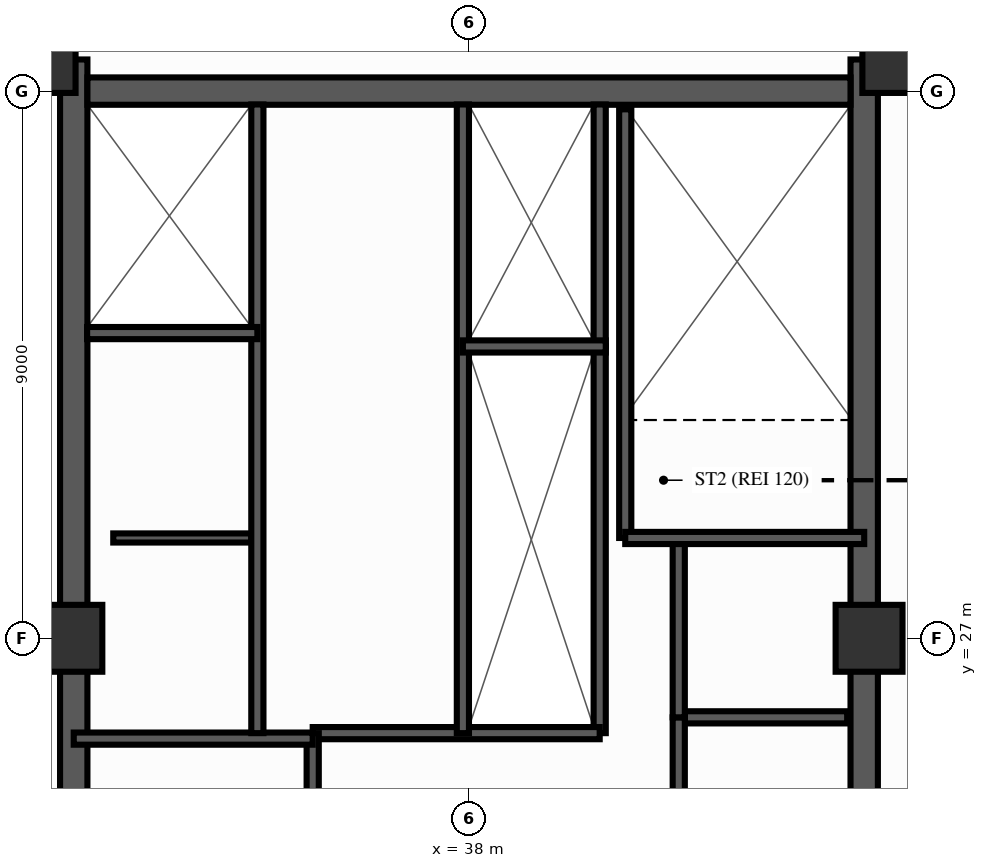
"""IFC4 building model, lengths in metres.
Left out: names, types, materials, properties, quantities, classifications, styles, units other than length and angle.
Written with IfcOpenShell. Run it as: python <this file> out.ifc"""

import sys

from ifc_helpers import new_model, si_unit, direction, frame, frame_2d, origin, origin_2d, place, context, subcontext, project, spatial, rectangle, extrude, source, transform, mapped, element, fill, save


model = new_model("IFC4")
c1 = context("Model", 3, precision=1e-05, world=origin(), true_north=direction((0.0, 1.0)))
c2 = subcontext(c1, "Body", "Model", "MODEL_VIEW")
j1 = project(units=[si_unit("LENGTHUNIT", "METRE"), si_unit("PLANEANGLEUNIT", "RADIAN")], contexts=[c1])
p1 = place(None, origin())
s1 = spatial("IfcSite", under=j1, at=p1, CompositionType="ELEMENT")
p2 = place(p1, origin())
s2 = spatial("IfcBuilding", under=s1, at=p2, CompositionType="ELEMENT")
p3 = place(p2, frame((0.0, 0.0, 148.7)))
s3 = spatial("IfcBuildingStorey", under=s2, at=p3, CompositionType="ELEMENT", Elevation=148.7)
p4 = place(p3, frame((31.5, 17.48, 0.0), z_axis=(0.0, 0.0, 1.0), x_axis=(0.0, 1.0, 0.0)))
e1 = element("IfcWall", 1, at=p4, inside=s3, PredefinedType="SHEAR", context=c2, shape_type="SweptSolid", body=[
    extrude(rectangle(XDim=19.04, YDim=0.45, at=frame_2d((9.52, 0.0))), origin(), (0.0, 0.0, 1.0), 3.5),
])
p5 = place(p4, frame((6.32, 0.0, 0.0)))
e2 = element("IfcOpeningElement", 2, at=p5, cuts=e1, PredefinedType="OPENING", context=c2, shape_type="SweptSolid", body=[
    extrude(rectangle(XDim=1.1, YDim=2.15, at=frame_2d((0.55, 1.075))), frame((0.0, 0.237, 0.0), z_axis=(0.0, -1.0, 0.0), x_axis=(1.0, 0.0, 0.0)), (0.0, 0.0, 1.0), 0.474),
])
p6 = place(p3, frame((44.5, 17.48, 0.0), z_axis=(0.0, 0.0, 1.0), x_axis=(0.0, 1.0, 0.0)))
e3 = element("IfcWall", 3, at=p6, inside=s3, PredefinedType="SHEAR", context=c2, shape_type="SweptSolid", body=[
    extrude(rectangle(XDim=19.04, YDim=0.45, at=frame_2d((9.52, 0.0))), origin(), (0.0, 0.0, 1.0), 3.5),
])
p7 = place(p6, frame((12.67, 0.0, 0.0), z_axis=(0.0, 0.0, 1.0), x_axis=(-1.0, 0.0, 0.0)))
e4 = element("IfcOpeningElement", 4, at=p7, cuts=e3, PredefinedType="OPENING", context=c2, shape_type="SweptSolid", body=[
    extrude(rectangle(XDim=1.1, YDim=2.15, at=frame_2d((0.55, 1.075))), frame((0.0, 0.237, 0.0), z_axis=(0.0, -1.0, 0.0), x_axis=(1.0, 0.0, 0.0)), (0.0, 0.0, 1.0), 0.474),
])
p8 = place(p3, frame((31.725, 36.0, 0.0), z_axis=(0.0, 0.0, 1.0), x_axis=(1.0, 0.0, 0.0)))
e5 = element("IfcWall", 5, at=p8, inside=s3, PredefinedType="SHEAR", context=c2, shape_type="SweptSolid", body=[
    extrude(rectangle(XDim=12.55, YDim=0.45, at=frame_2d((6.275, 0.0))), origin(), (0.0, 0.0, 1.0), 3.5),
])
p9 = place(p8, frame((5.225, 0.0, 0.0), z_axis=(0.0, 0.0, 1.0), x_axis=(-1.0, 0.0, 0.0)))
e6 = element("IfcOpeningElement", 6, at=p9, cuts=e5, PredefinedType="OPENING", context=c2, shape_type="SweptSolid", body=[
    extrude(rectangle(XDim=1.4, YDim=2.15, at=frame_2d((0.7, 1.075))), frame((0.0, 0.237, 0.0), z_axis=(0.0, -1.0, 0.0), x_axis=(1.0, 0.0, 0.0)), (0.0, 0.0, 1.0), 0.474),
])
m1 = source(origin(), c2, "Body", "SweptSolid", [
    extrude(rectangle(XDim=1.1, YDim=1.1, at=origin_2d()), origin(), (0.0, 0.0, 1.0), 3.5),
])
for number, where, z_axis, x_axis in (
    (7, (30.98, 36.52, 0.0), (0.0, 0.0, 1.0), (1.0, 0.0, 0.0)),
    (8, (45.02, 36.52, 0.0), (0.0, 0.0, 1.0), (1.0, 0.0, 0.0)),
    (9, (31.42, 27.0, 0.0), (0.0, 0.0, 1.0), (1.0, 0.0, 0.0)),
    (10, (44.58, 27.0, 0.0), (0.0, 0.0, 1.0), (1.0, 0.0, 0.0)),
):
    element("IfcColumn", number, at=place(p3, frame(where, z_axis=z_axis, x_axis=x_axis)), inside=s3, PredefinedType="COLUMN", context=c2, shape_type="MappedRepresentation", body=[
        mapped(m1, transform((0.0, 0.0, 0.0), scale=1.0)),
    ])
p10 = place(p3, frame((32.15, 28.65, 0.0), z_axis=(0.0, 0.0, 1.0), x_axis=(1.0, 0.0, 0.0)))
e11 = element("IfcWall", 11, at=p10, inside=s3, PredefinedType="PARTITIONING", context=c2, shape_type="SweptSolid", body=[
    extrude(rectangle(XDim=2.27, YDim=0.15, at=frame_2d((1.135, 0.0))), origin(), (0.0, 0.0, 1.0), 2.64),
])
p11 = place(p3, frame((41.55, 25.7, 0.0), z_axis=(0.0, 0.0, 1.0), x_axis=(1.0, 0.0, 0.0)))
e12 = element("IfcWall", 12, at=p11, inside=s3, PredefinedType="PARTITIONING", context=c2, shape_type="SweptSolid", body=[
    extrude(rectangle(XDim=2.67, YDim=0.2, at=frame_2d((1.335, 0.0))), origin(), (0.0, 0.0, 1.0), 2.64),
])
p12 = place(p3, frame((41.45, 22.75, 0.0), z_axis=(0.0, 0.0, 1.0), x_axis=(0.0, 1.0, 0.0)))
e13 = element("IfcWall", 13, at=p12, inside=s3, PredefinedType="PARTITIONING", context=c2, shape_type="SweptSolid", body=[
    extrude(rectangle(XDim=2.95, YDim=0.2, at=frame_2d((1.475, 0.0))), origin(), (0.0, 0.0, 1.0), 3.16),
])
p13 = place(p12, frame((1.05, 0.0, 0.0)))
e14 = element("IfcOpeningElement", 14, at=p13, cuts=e13, PredefinedType="OPENING", context=c2, shape_type="SweptSolid", body=[
    extrude(rectangle(XDim=0.8, YDim=2.05, at=frame_2d((0.4, 1.025))), frame((0.0, 0.112, 0.0), z_axis=(0.0, -1.0, 0.0), x_axis=(1.0, 0.0, 0.0)), (0.0, 0.0, 1.0), 0.224),
])
p14 = place(p3, frame((41.45, 25.7, 0.0), z_axis=(0.0, 0.0, 1.0), x_axis=(0.0, 1.0, 0.0)))
e15 = element("IfcWall", 15, at=p14, inside=s3, PredefinedType="PARTITIONING", context=c2, shape_type="SweptSolid", body=[
    extrude(rectangle(XDim=2.9, YDim=0.2, at=frame_2d((1.45, 0.0))), origin(), (0.0, 0.0, 1.0), 3.16),
])
p15 = place(p14, frame((1.0, 0.0, 0.0)))
e16 = element("IfcOpeningElement", 16, at=p15, cuts=e15, PredefinedType="OPENING", context=c2, shape_type="SweptSolid", body=[
    extrude(rectangle(XDim=0.9, YDim=2.1, at=frame_2d((0.45, 1.05))), frame((0.0, 0.112, 0.0), z_axis=(0.0, -1.0, 0.0), x_axis=(1.0, 0.0, 0.0)), (0.0, 0.0, 1.0), 0.224),
])
p16 = place(p3, frame((40.15, 25.44, 0.0), z_axis=(0.0, 0.0, 1.0), x_axis=(0.0, 1.0, 0.0)))
e17 = element("IfcWall", 17, at=p16, inside=s3, PredefinedType="PARTITIONING", context=c2, shape_type="SweptSolid", body=[
    extrude(rectangle(XDim=6.36, YDim=0.2, at=frame_2d((3.18, 0.0))), origin(), (0.0, 0.0, 1.0), 3.16),
])
p17 = place(p3, frame((40.15, 31.8, 0.0), z_axis=(0.0, 0.0, 1.0), x_axis=(0.0, 1.0, 0.0)))
e18 = element("IfcWall", 18, at=p17, inside=s3, PredefinedType="PARTITIONING", context=c2, shape_type="SweptSolid", body=[
    extrude(rectangle(XDim=3.98, YDim=0.2, at=frame_2d((1.99, 0.0))), origin(), (0.0, 0.0, 1.0), 3.16),
])
p18 = place(p3, frame((35.43, 25.44, 0.0), z_axis=(0.0, 0.0, 1.0), x_axis=(1.0, 0.0, 0.0)))
e19 = element("IfcWall", 19, at=p18, inside=s3, PredefinedType="PARTITIONING", context=c2, shape_type="SweptSolid", body=[
    extrude(rectangle(XDim=4.72, YDim=0.2, at=frame_2d((2.36, 0.0))), origin(), (0.0, 0.0, 1.0), 3.16),
])
p19 = place(p18, frame((1.25, 0.0, 0.0)))
e20 = element("IfcOpeningElement", 20, at=p19, cuts=e19, PredefinedType="OPENING", context=c2, shape_type="SweptSolid", body=[
    extrude(rectangle(XDim=1.1, YDim=2.15, at=frame_2d((0.55, 1.075))), frame((0.0, 0.112, 0.0), z_axis=(0.0, -1.0, 0.0), x_axis=(1.0, 0.0, 0.0)), (0.0, 0.0, 1.0), 0.224),
])
p20 = place(p3, frame((35.43, 18.22, 0.0), z_axis=(0.0, 0.0, 1.0), x_axis=(0.0, 1.0, 0.0)))
e21 = element("IfcWall", 21, at=p20, inside=s3, PredefinedType="SOLIDWALL", context=c2, shape_type="SweptSolid", body=[
    extrude(rectangle(XDim=7.22, YDim=0.2, at=frame_2d((3.61, 0.0))), origin(), (0.0, 0.0, 1.0), 3.29),
])
p21 = place(p20, frame((6.68, 0.0, 0.0), z_axis=(0.0, 0.0, 1.0), x_axis=(-1.0, 0.0, 0.0)))
e22 = element("IfcOpeningElement", 22, at=p21, cuts=e21, PredefinedType="OPENING", context=c2, shape_type="SweptSolid", body=[
    extrude(rectangle(XDim=1.1, YDim=2.15, at=frame_2d((0.55, 1.075))), frame((0.0, 0.112, 0.0), z_axis=(0.0, -1.0, 0.0), x_axis=(1.0, 0.0, 0.0)), (0.0, 0.0, 1.0), 0.224),
])
p22 = place(p3, frame((31.5, 25.35, 0.0), z_axis=(0.0, 0.0, 1.0), x_axis=(1.0, 0.0, 0.0)))
e23 = element("IfcWall", 23, at=p22, inside=s3, PredefinedType="SOLIDWALL", context=c2, shape_type="SweptSolid", body=[
    extrude(rectangle(XDim=3.93, YDim=0.2, at=frame_2d((1.965, 0.0))), origin(), (0.0, 0.0, 1.0), 3.29),
])
p23 = place(p3, frame((40.57, 28.65, 0.0), z_axis=(0.0, 0.0, 1.0), x_axis=(0.0, 1.0, 0.0)))
e24 = element("IfcWall", 24, at=p23, inside=s3, PredefinedType="SOLIDWALL", context=c2, shape_type="SweptSolid", body=[
    extrude(rectangle(XDim=7.05, YDim=0.2, at=frame_2d((3.525, 0.0))), origin(), (0.0, 0.0, 1.0), 3.29),
])
p24 = place(p3, frame((40.57, 28.65, 0.0), z_axis=(0.0, 0.0, 1.0), x_axis=(1.0, 0.0, 0.0)))
e25 = element("IfcWall", 25, at=p24, inside=s3, PredefinedType="SOLIDWALL", context=c2, shape_type="SweptSolid", body=[
    extrude(rectangle(XDim=3.93, YDim=0.2, at=frame_2d((1.965, 0.0))), origin(), (0.0, 0.0, 1.0), 3.29),
])
p25 = place(p3, frame((34.52, 25.44, 0.0), z_axis=(0.0, 0.0, 1.0), x_axis=(0.0, 1.0, 0.0)))
e26 = element("IfcWall", 26, at=p25, inside=s3, PredefinedType="PARTITIONING", context=c2, shape_type="SweptSolid", body=[
    extrude(rectangle(XDim=10.34, YDim=0.2, at=frame_2d((5.17, 0.0))), origin(), (0.0, 0.0, 1.0), 3.16),
])
p26 = place(p25, frame((1.15, 0.0, 0.0)))
e27 = element("IfcOpeningElement", 27, at=p26, cuts=e26, PredefinedType="OPENING", context=c2, shape_type="SweptSolid", body=[
    extrude(rectangle(XDim=0.9, YDim=2.1, at=frame_2d((0.45, 1.05))), frame((0.0, 0.112, 0.0), z_axis=(0.0, -1.0, 0.0), x_axis=(1.0, 0.0, 0.0)), (0.0, 0.0, 1.0), 0.224),
])
p27 = place(p25, frame((4.35, 0.0, 0.0)))
e28 = element("IfcOpeningElement", 28, at=p27, cuts=e26, PredefinedType="OPENING", context=c2, shape_type="SweptSolid", body=[
    extrude(rectangle(XDim=0.9, YDim=2.1, at=frame_2d((0.45, 1.05))), frame((0.0, 0.112, 0.0), z_axis=(0.0, -1.0, 0.0), x_axis=(1.0, 0.0, 0.0)), (0.0, 0.0, 1.0), 0.224),
])
p28 = place(p25, frame((7.01, 0.0, 0.0)))
e29 = element("IfcOpeningElement", 29, at=p28, cuts=e26, PredefinedType="OPENING", context=c2, shape_type="SweptSolid", body=[
    extrude(rectangle(XDim=1.0, YDim=2.15, at=frame_2d((0.5, 1.075))), frame((0.0, 0.112, 0.0), z_axis=(0.0, -1.0, 0.0), x_axis=(1.0, 0.0, 0.0)), (0.0, 0.0, 1.0), 0.224),
])
p29 = place(p25, frame((8.76, 0.0, 0.0)))
e30 = element("IfcOpeningElement", 30, at=p29, cuts=e26, PredefinedType="OPENING", context=c2, shape_type="SweptSolid", body=[
    extrude(rectangle(XDim=1.0, YDim=2.15, at=frame_2d((0.5, 1.075))), frame((0.0, 0.112, 0.0), z_axis=(0.0, -1.0, 0.0), x_axis=(1.0, 0.0, 0.0)), (0.0, 0.0, 1.0), 0.224),
])
p30 = place(p3, frame((31.72, 32.02, 0.0), z_axis=(0.0, 0.0, 1.0), x_axis=(1.0, 0.0, 0.0)))
e31 = element("IfcWall", 31, at=p30, inside=s3, PredefinedType="PARTITIONING", context=c2, shape_type="SweptSolid", body=[
    extrude(rectangle(XDim=2.8, YDim=0.2, at=frame_2d((1.4, 0.0))), origin(), (0.0, 0.0, 1.0), 3.16),
])
p31 = place(p3, frame((37.9, 25.44, 0.0), z_axis=(0.0, 0.0, 1.0), x_axis=(0.0, 1.0, 0.0)))
e32 = element("IfcWall", 32, at=p31, inside=s3, PredefinedType="PARTITIONING", context=c2, shape_type="SweptSolid", body=[
    extrude(rectangle(XDim=10.34, YDim=0.2, at=frame_2d((5.17, 0.0))), origin(), (0.0, 0.0, 1.0), 3.16),
])
p32 = place(p31, frame((0.32, 0.0, 0.0)))
e33 = element("IfcOpeningElement", 33, at=p32, cuts=e32, PredefinedType="OPENING", context=c2, shape_type="SweptSolid", body=[
    extrude(rectangle(XDim=1.0, YDim=2.15, at=frame_2d((0.5, 1.075))), frame((0.0, 0.112, 0.0), z_axis=(0.0, -1.0, 0.0), x_axis=(1.0, 0.0, 0.0)), (0.0, 0.0, 1.0), 0.224),
])
p33 = place(p31, frame((1.71, 0.0, 0.0)))
e34 = element("IfcOpeningElement", 34, at=p33, cuts=e32, PredefinedType="OPENING", context=c2, shape_type="SweptSolid", body=[
    extrude(rectangle(XDim=1.0, YDim=2.15, at=frame_2d((0.5, 1.075))), frame((0.0, 0.112, 0.0), z_axis=(0.0, -1.0, 0.0), x_axis=(1.0, 0.0, 0.0)), (0.0, 0.0, 1.0), 0.224),
])
p34 = place(p31, frame((3.51, 0.0, 0.0)))
e35 = element("IfcOpeningElement", 35, at=p34, cuts=e32, PredefinedType="OPENING", context=c2, shape_type="SweptSolid", body=[
    extrude(rectangle(XDim=1.0, YDim=2.15, at=frame_2d((0.5, 1.075))), frame((0.0, 0.112, 0.0), z_axis=(0.0, -1.0, 0.0), x_axis=(1.0, 0.0, 0.0)), (0.0, 0.0, 1.0), 0.224),
])
p35 = place(p31, frame((5.01, 0.0, 0.0)))
e36 = element("IfcOpeningElement", 36, at=p35, cuts=e32, PredefinedType="OPENING", context=c2, shape_type="SweptSolid", body=[
    extrude(rectangle(XDim=1.0, YDim=2.15, at=frame_2d((0.5, 1.075))), frame((0.0, 0.112, 0.0), z_axis=(0.0, -1.0, 0.0), x_axis=(1.0, 0.0, 0.0)), (0.0, 0.0, 1.0), 0.224),
])
p36 = place(p31, frame((6.86, 0.0, 0.0)))
e37 = element("IfcOpeningElement", 37, at=p36, cuts=e32, PredefinedType="OPENING", context=c2, shape_type="SweptSolid", body=[
    extrude(rectangle(XDim=1.0, YDim=2.15, at=frame_2d((0.5, 1.075))), frame((0.0, 0.112, 0.0), z_axis=(0.0, -1.0, 0.0), x_axis=(1.0, 0.0, 0.0)), (0.0, 0.0, 1.0), 0.224),
])
p37 = place(p31, frame((8.71, 0.0, 0.0)))
e38 = element("IfcOpeningElement", 38, at=p37, cuts=e32, PredefinedType="OPENING", context=c2, shape_type="SweptSolid", body=[
    extrude(rectangle(XDim=1.0, YDim=2.15, at=frame_2d((0.5, 1.075))), frame((0.0, 0.112, 0.0), z_axis=(0.0, -1.0, 0.0), x_axis=(1.0, 0.0, 0.0)), (0.0, 0.0, 1.0), 0.224),
])
p38 = place(p3, frame((37.9, 31.8, 0.0), z_axis=(0.0, 0.0, 1.0), x_axis=(1.0, 0.0, 0.0)))
e39 = element("IfcWall", 39, at=p38, inside=s3, PredefinedType="PARTITIONING", context=c2, shape_type="SweptSolid", body=[
    extrude(rectangle(XDim=2.35, YDim=0.2, at=frame_2d((1.175, 0.0))), origin(), (0.0, 0.0, 1.0), 3.16),
])
m2 = source(origin(), c2, "Body", "SweptSolid", [
    extrude(rectangle(XDim=1.1, YDim=2.15, at=frame_2d((0.55, 1.075))), frame((0.0, 0.025, 0.0), z_axis=(0.0, -1.0, 0.0), x_axis=(1.0, 0.0, 0.0)), (0.0, 0.0, 1.0), 0.05),
])
p39 = place(p5, origin())
e40 = element("IfcDoor", 40, at=p39, inside=s3, OperationType="SINGLE_SWING_LEFT", PredefinedType="DOOR", context=c2, shape_type="MappedRepresentation", body=[
    mapped(m2, transform((0.0, 0.0, 0.0), scale=1.0)),
])
fill(e2, e40)
p40 = place(p7, origin())
e41 = element("IfcDoor", 41, at=p40, inside=s3, OperationType="SINGLE_SWING_RIGHT", PredefinedType="DOOR", context=c2, shape_type="MappedRepresentation", body=[
    mapped(m2, transform((0.0, 0.0, 0.0), scale=1.0)),
])
fill(e4, e41)
m3 = source(origin(), c2, "Body", "SweptSolid", [
    extrude(rectangle(XDim=1.4, YDim=2.15, at=frame_2d((0.7, 1.075))), frame((0.0, 0.025, 0.0), z_axis=(0.0, -1.0, 0.0), x_axis=(1.0, 0.0, 0.0)), (0.0, 0.0, 1.0), 0.05),
])
p41 = place(p9, origin())
e42 = element("IfcDoor", 42, at=p41, inside=s3, OperationType="SINGLE_SWING_RIGHT", PredefinedType="DOOR", context=c2, shape_type="MappedRepresentation", body=[
    mapped(m3, transform((0.0, 0.0, 0.0), scale=1.0)),
])
fill(e6, e42)
m4 = source(origin(), c2, "Body", "SweptSolid", [
    extrude(rectangle(XDim=0.8, YDim=2.05, at=frame_2d((0.4, 1.025))), frame((0.0, 0.025, 0.0), z_axis=(0.0, -1.0, 0.0), x_axis=(1.0, 0.0, 0.0)), (0.0, 0.0, 1.0), 0.05),
])
p42 = place(p13, origin())
e43 = element("IfcDoor", 43, at=p42, inside=s3, OperationType="SINGLE_SWING_RIGHT", PredefinedType="DOOR", context=c2, shape_type="MappedRepresentation", body=[
    mapped(m4, transform((0.0, 0.0, 0.0), scale=1.0)),
])
fill(e14, e43)
m5 = source(origin(), c2, "Body", "SweptSolid", [
    extrude(rectangle(XDim=0.9, YDim=2.1, at=frame_2d((0.45, 1.05))), frame((0.0, 0.025, 0.0), z_axis=(0.0, -1.0, 0.0), x_axis=(1.0, 0.0, 0.0)), (0.0, 0.0, 1.0), 0.05),
])
p43 = place(p15, origin())
e44 = element("IfcDoor", 44, at=p43, inside=s3, OperationType="SINGLE_SWING_LEFT", PredefinedType="DOOR", context=c2, shape_type="MappedRepresentation", body=[
    mapped(m5, transform((0.0, 0.0, 0.0), scale=1.0)),
])
fill(e16, e44)
p44 = place(p19, origin())
e45 = element("IfcDoor", 45, at=p44, inside=s3, OperationType="SINGLE_SWING_RIGHT", PredefinedType="DOOR", context=c2, shape_type="MappedRepresentation", body=[
    mapped(m2, transform((0.0, 0.0, 0.0), scale=1.0)),
])
fill(e20, e45)
p45 = place(p21, origin())
e46 = element("IfcDoor", 46, at=p45, inside=s3, OperationType="SINGLE_SWING_LEFT", PredefinedType="DOOR", context=c2, shape_type="MappedRepresentation", body=[
    mapped(m2, transform((0.0, 0.0, 0.0), scale=1.0)),
])
fill(e22, e46)
p46 = place(p26, origin())
e47 = element("IfcDoor", 47, at=p46, inside=s3, OperationType="SINGLE_SWING_RIGHT", PredefinedType="DOOR", context=c2, shape_type="MappedRepresentation", body=[
    mapped(m5, transform((0.0, 0.0, 0.0), scale=1.0)),
])
fill(e27, e47)
p47 = place(p27, origin())
e48 = element("IfcDoor", 48, at=p47, inside=s3, OperationType="SINGLE_SWING_LEFT", PredefinedType="DOOR", context=c2, shape_type="MappedRepresentation", body=[
    mapped(m5, transform((0.0, 0.0, 0.0), scale=1.0)),
])
fill(e28, e48)
m6 = source(origin(), c2, "Body", "SweptSolid", [
    extrude(rectangle(XDim=1.0, YDim=2.15, at=frame_2d((0.5, 1.075))), frame((0.0, 0.025, 0.0), z_axis=(0.0, -1.0, 0.0), x_axis=(1.0, 0.0, 0.0)), (0.0, 0.0, 1.0), 0.05),
])
p48 = place(p28, origin())
e49 = element("IfcDoor", 49, at=p48, inside=s3, OperationType="DOUBLE_DOOR_SLIDING", PredefinedType="DOOR", context=c2, shape_type="MappedRepresentation", body=[
    mapped(m6, transform((0.0, 0.0, 0.0), scale=1.0)),
])
fill(e29, e49)
p49 = place(p29, origin())
e50 = element("IfcDoor", 50, at=p49, inside=s3, OperationType="DOUBLE_DOOR_SLIDING", PredefinedType="DOOR", context=c2, shape_type="MappedRepresentation", body=[
    mapped(m6, transform((0.0, 0.0, 0.0), scale=1.0)),
])
fill(e30, e50)
p50 = place(p32, origin())
e51 = element("IfcDoor", 51, at=p50, inside=s3, OperationType="DOUBLE_DOOR_SLIDING", PredefinedType="DOOR", context=c2, shape_type="MappedRepresentation", body=[
    mapped(m6, transform((0.0, 0.0, 0.0), scale=1.0)),
])
fill(e33, e51)
p51 = place(p33, origin())
e52 = element("IfcDoor", 52, at=p51, inside=s3, OperationType="DOUBLE_DOOR_SLIDING", PredefinedType="DOOR", context=c2, shape_type="MappedRepresentation", body=[
    mapped(m6, transform((0.0, 0.0, 0.0), scale=1.0)),
])
fill(e34, e52)
p52 = place(p34, origin())
e53 = element("IfcDoor", 53, at=p52, inside=s3, OperationType="DOUBLE_DOOR_SLIDING", PredefinedType="DOOR", context=c2, shape_type="MappedRepresentation", body=[
    mapped(m6, transform((0.0, 0.0, 0.0), scale=1.0)),
])
fill(e35, e53)
p53 = place(p35, origin())
e54 = element("IfcDoor", 54, at=p53, inside=s3, OperationType="DOUBLE_DOOR_SLIDING", PredefinedType="DOOR", context=c2, shape_type="MappedRepresentation", body=[
    mapped(m6, transform((0.0, 0.0, 0.0), scale=1.0)),
])
fill(e36, e54)
p54 = place(p36, origin())
e55 = element("IfcDoor", 55, at=p54, inside=s3, OperationType="DOUBLE_DOOR_SLIDING", PredefinedType="DOOR", context=c2, shape_type="MappedRepresentation", body=[
    mapped(m6, transform((0.0, 0.0, 0.0), scale=1.0)),
])
fill(e37, e55)
p55 = place(p37, origin())
e56 = element("IfcDoor", 56, at=p55, inside=s3, OperationType="DOUBLE_DOOR_SLIDING", PredefinedType="DOOR", context=c2, shape_type="MappedRepresentation", body=[
    mapped(m6, transform((0.0, 0.0, 0.0), scale=1.0)),
])
fill(e38, e56)
save(model, sys.argv[1])
